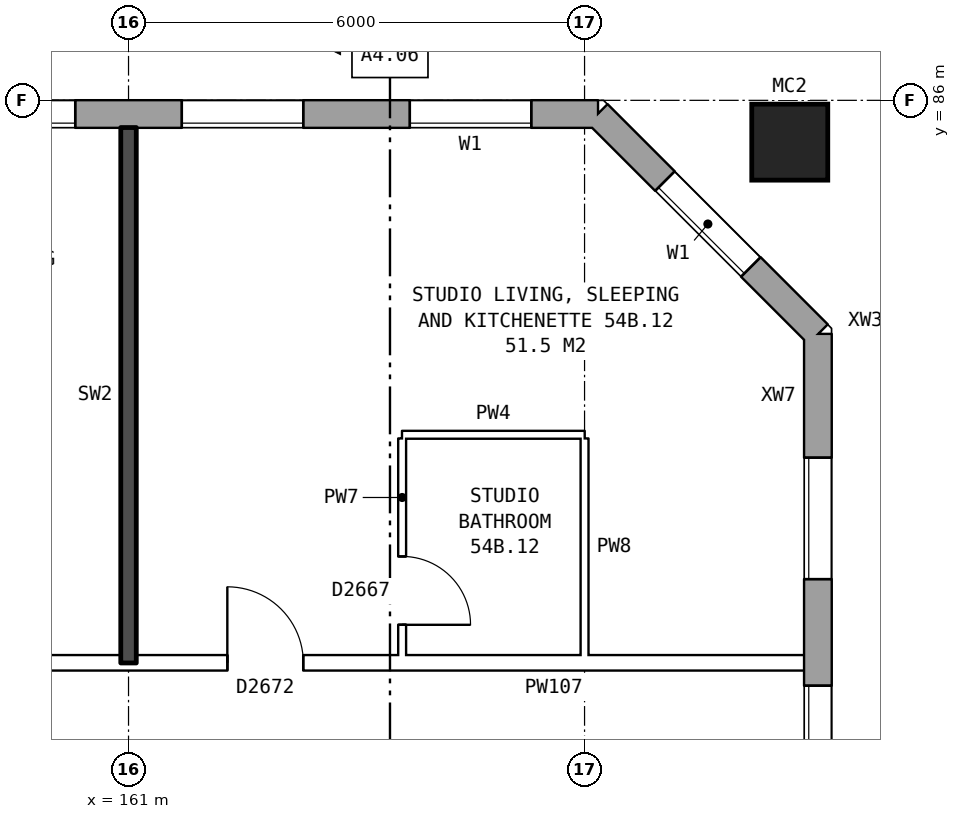
"""IFC4 building model, lengths in metres.
Left out: names, types, materials, properties, quantities, classifications, styles, units other than length and angle.
Written with IfcOpenShell. Run it as: python <this file> out.ifc"""

import sys

from ifc_helpers import new_model, si_unit, direction, frame, frame_2d, origin, origin_2d, place, context, subcontext, project, spatial, rectangle, hollow_rectangle, extrude, element, fill, save


model = new_model("IFC4")
c1 = context("Model", 3, precision=1e-05, world=origin(), true_north=direction((0.0, 1.0)))
c2 = subcontext(c1, "Body", "Model", "MODEL_VIEW")
j1 = project(units=[si_unit("LENGTHUNIT", "METRE"), si_unit("PLANEANGLEUNIT", "RADIAN")], contexts=[c1])
p1 = place(None, origin())
s1 = spatial("IfcSite", under=j1, at=p1, CompositionType="ELEMENT")
p2 = place(p1, origin())
s2 = spatial("IfcBuilding", under=s1, at=p2, CompositionType="ELEMENT")
p3 = place(p2, frame((0.0, 0.0, 191.3)))
s3 = spatial("IfcBuildingStorey", under=s2, at=p3, CompositionType="ELEMENT", Elevation=191.3)
p4 = place(p3, frame((169.7, 85.45, 0.0), z_axis=(0.0, 0.0, 1.0), x_axis=(1.0, 0.0, 0.0)))
e1 = element("IfcColumn", 1, at=p4, inside=s3, PredefinedType="COLUMN", context=c2, shape_type="SweptSolid", body=[
    extrude(hollow_rectangle(XDim=1.0, YDim=1.0, WallThickness=0.055, at=origin_2d()), origin(), (0.0, 0.0, 1.0), 3.1),
])
p5 = place(p3, frame((170.07, 57.075, 0.0), z_axis=(0.0, 0.0, 1.0), x_axis=(0.0, 1.0, 0.0)))
e2 = element("IfcWall", 2, at=p5, inside=s3, PredefinedType="STANDARD", context=c2, shape_type="SweptSolid", body=[
    extrude(rectangle(XDim=25.851, YDim=0.36, at=frame_2d((12.925, 0.0))), origin(), (0.0, 0.0, 1.0), 2.85),
])
p6 = place(p5, frame((1.625, 0.0, 0.8)))
e3 = element("IfcOpeningElement", 3, at=p6, cuts=e2, PredefinedType="OPENING", context=c2, shape_type="SweptSolid", body=[
    extrude(rectangle(XDim=1.6, YDim=1.8, at=frame_2d((0.8, 0.9))), frame((0.0, 0.19, 0.0), z_axis=(0.0, -1.0, 0.0), x_axis=(1.0, 0.0, 0.0)), (0.0, 0.0, 1.0), 0.38),
])
p7 = place(p5, frame((4.625, 0.0, 0.8)))
e4 = element("IfcOpeningElement", 4, at=p7, cuts=e2, PredefinedType="OPENING", context=c2, shape_type="SweptSolid", body=[
    extrude(rectangle(XDim=1.6, YDim=1.8, at=frame_2d((0.8, 0.9))), frame((0.0, 0.19, 0.0), z_axis=(0.0, -1.0, 0.0), x_axis=(1.0, 0.0, 0.0)), (0.0, 0.0, 1.0), 0.38),
])
p8 = place(p5, frame((7.625, 0.0, 0.8)))
e5 = element("IfcOpeningElement", 5, at=p8, cuts=e2, PredefinedType="OPENING", context=c2, shape_type="SweptSolid", body=[
    extrude(rectangle(XDim=1.6, YDim=1.8, at=frame_2d((0.8, 0.9))), frame((0.0, 0.19, 0.0), z_axis=(0.0, -1.0, 0.0), x_axis=(1.0, 0.0, 0.0)), (0.0, 0.0, 1.0), 0.38),
])
p9 = place(p5, frame((10.625, 0.0, 0.8)))
e6 = element("IfcOpeningElement", 6, at=p9, cuts=e2, PredefinedType="OPENING", context=c2, shape_type="SweptSolid", body=[
    extrude(rectangle(XDim=1.6, YDim=1.8, at=frame_2d((0.8, 0.9))), frame((0.0, 0.19, 0.0), z_axis=(0.0, -1.0, 0.0), x_axis=(1.0, 0.0, 0.0)), (0.0, 0.0, 1.0), 0.38),
])
p10 = place(p5, frame((13.625, 0.0, 0.8)))
e7 = element("IfcOpeningElement", 7, at=p10, cuts=e2, PredefinedType="OPENING", context=c2, shape_type="SweptSolid", body=[
    extrude(rectangle(XDim=1.6, YDim=1.8, at=frame_2d((0.8, 0.9))), frame((0.0, 0.19, 0.0), z_axis=(0.0, -1.0, 0.0), x_axis=(1.0, 0.0, 0.0)), (0.0, 0.0, 1.0), 0.38),
])
p11 = place(p5, frame((16.625, 0.0, 0.8)))
e8 = element("IfcOpeningElement", 8, at=p11, cuts=e2, PredefinedType="OPENING", context=c2, shape_type="SweptSolid", body=[
    extrude(rectangle(XDim=1.6, YDim=1.8, at=frame_2d((0.8, 0.9))), frame((0.0, 0.19, 0.0), z_axis=(0.0, -1.0, 0.0), x_axis=(1.0, 0.0, 0.0)), (0.0, 0.0, 1.0), 0.38),
])
p12 = place(p5, frame((19.625, 0.0, 0.8)))
e9 = element("IfcOpeningElement", 9, at=p12, cuts=e2, PredefinedType="OPENING", context=c2, shape_type="SweptSolid", body=[
    extrude(rectangle(XDim=1.6, YDim=1.8, at=frame_2d((0.8, 0.9))), frame((0.0, 0.19, 0.0), z_axis=(0.0, -1.0, 0.0), x_axis=(1.0, 0.0, 0.0)), (0.0, 0.0, 1.0), 0.38),
])
p13 = place(p5, frame((22.625, 0.0, 0.8)))
e10 = element("IfcOpeningElement", 10, at=p13, cuts=e2, PredefinedType="OPENING", context=c2, shape_type="SweptSolid", body=[
    extrude(rectangle(XDim=1.6, YDim=1.8, at=frame_2d((0.8, 0.9))), frame((0.0, 0.19, 0.0), z_axis=(0.0, -1.0, 0.0), x_axis=(1.0, 0.0, 0.0)), (0.0, 0.0, 1.0), 0.38),
])
p14 = place(p3, frame((170.07, 82.925, 0.0), z_axis=(0.0, 0.0, 1.0), x_axis=(-0.707106781187, 0.707106781187, 0.0)))
e11 = element("IfcWall", 11, at=p14, inside=s3, PredefinedType="STANDARD", context=c2, shape_type="SweptSolid", body=[
    extrude(rectangle(XDim=4.094, YDim=0.36, at=frame_2d((2.047, 0.0))), origin(), (0.0, 0.0, 1.0), 2.85),
])
p15 = place(p14, frame((1.247, 0.0, 0.8)))
e12 = element("IfcOpeningElement", 12, at=p15, cuts=e11, PredefinedType="OPENING", context=c2, shape_type="SweptSolid", body=[
    extrude(rectangle(XDim=1.6, YDim=1.8, at=frame_2d((0.8, 0.9))), frame((0.0, 0.19, 0.0), z_axis=(0.0, -1.0, 0.0), x_axis=(1.0, 0.0, 0.0)), (0.0, 0.0, 1.0), 0.38),
])
p16 = place(p3, frame((167.175, 85.82, 0.0), z_axis=(0.0, 0.0, 1.0), x_axis=(-1.0, 0.0, 0.0)))
e13 = element("IfcWall", 13, at=p16, inside=s3, PredefinedType="STANDARD", context=c2, shape_type="SweptSolid", body=[
    extrude(rectangle(XDim=33.101, YDim=0.36, at=frame_2d((16.55, 0.0))), origin(), (0.0, 0.0, 1.0), 2.85),
])
p17 = place(p16, frame((0.875, 0.0, 0.8)))
e14 = element("IfcOpeningElement", 14, at=p17, cuts=e13, PredefinedType="OPENING", context=c2, shape_type="SweptSolid", body=[
    extrude(rectangle(XDim=1.6, YDim=1.8, at=frame_2d((0.8, 0.9))), frame((0.0, 0.19, 0.0), z_axis=(0.0, -1.0, 0.0), x_axis=(1.0, 0.0, 0.0)), (0.0, 0.0, 1.0), 0.38),
])
p18 = place(p16, frame((3.875, 0.0, 0.8)))
e15 = element("IfcOpeningElement", 15, at=p18, cuts=e13, PredefinedType="OPENING", context=c2, shape_type="SweptSolid", body=[
    extrude(rectangle(XDim=1.6, YDim=1.8, at=frame_2d((0.8, 0.9))), frame((0.0, 0.19, 0.0), z_axis=(0.0, -1.0, 0.0), x_axis=(1.0, 0.0, 0.0)), (0.0, 0.0, 1.0), 0.38),
])
p19 = place(p16, frame((6.875, 0.0, 0.8)))
e16 = element("IfcOpeningElement", 16, at=p19, cuts=e13, PredefinedType="OPENING", context=c2, shape_type="SweptSolid", body=[
    extrude(rectangle(XDim=1.6, YDim=1.8, at=frame_2d((0.8, 0.9))), frame((0.0, 0.19, 0.0), z_axis=(0.0, -1.0, 0.0), x_axis=(1.0, 0.0, 0.0)), (0.0, 0.0, 1.0), 0.38),
])
p20 = place(p16, frame((9.875, 0.0, 0.8)))
e17 = element("IfcOpeningElement", 17, at=p20, cuts=e13, PredefinedType="OPENING", context=c2, shape_type="SweptSolid", body=[
    extrude(rectangle(XDim=1.6, YDim=1.8, at=frame_2d((0.8, 0.9))), frame((0.0, 0.19, 0.0), z_axis=(0.0, -1.0, 0.0), x_axis=(1.0, 0.0, 0.0)), (0.0, 0.0, 1.0), 0.38),
])
p21 = place(p16, frame((12.875, 0.0, 0.8)))
e18 = element("IfcOpeningElement", 18, at=p21, cuts=e13, PredefinedType="OPENING", context=c2, shape_type="SweptSolid", body=[
    extrude(rectangle(XDim=1.6, YDim=1.8, at=frame_2d((0.8, 0.9))), frame((0.0, 0.19, 0.0), z_axis=(0.0, -1.0, 0.0), x_axis=(1.0, 0.0, 0.0)), (0.0, 0.0, 1.0), 0.38),
])
p22 = place(p16, frame((15.925, 0.0, 0.15)))
e19 = element("IfcOpeningElement", 19, at=p22, cuts=e13, PredefinedType="OPENING", context=c2, shape_type="SweptSolid", body=[
    extrude(rectangle(XDim=1.2, YDim=1.2, at=frame_2d((0.6, 0.6))), frame((0.0, 0.19, 0.0), z_axis=(0.0, -1.0, 0.0), x_axis=(1.0, 0.0, 0.0)), (0.0, 0.0, 1.0), 0.38),
])
p23 = place(p16, frame((18.875, 0.0, 0.8)))
e20 = element("IfcOpeningElement", 20, at=p23, cuts=e13, PredefinedType="OPENING", context=c2, shape_type="SweptSolid", body=[
    extrude(rectangle(XDim=1.6, YDim=1.8, at=frame_2d((0.8, 0.9))), frame((0.0, 0.19, 0.0), z_axis=(0.0, -1.0, 0.0), x_axis=(1.0, 0.0, 0.0)), (0.0, 0.0, 1.0), 0.38),
])
p24 = place(p16, frame((21.875, 0.0, 0.8)))
e21 = element("IfcOpeningElement", 21, at=p24, cuts=e13, PredefinedType="OPENING", context=c2, shape_type="SweptSolid", body=[
    extrude(rectangle(XDim=1.6, YDim=1.8, at=frame_2d((0.8, 0.9))), frame((0.0, 0.19, 0.0), z_axis=(0.0, -1.0, 0.0), x_axis=(1.0, 0.0, 0.0)), (0.0, 0.0, 1.0), 0.38),
])
p25 = place(p16, frame((24.875, 0.0, 0.8)))
e22 = element("IfcOpeningElement", 22, at=p25, cuts=e13, PredefinedType="OPENING", context=c2, shape_type="SweptSolid", body=[
    extrude(rectangle(XDim=1.6, YDim=1.8, at=frame_2d((0.8, 0.9))), frame((0.0, 0.19, 0.0), z_axis=(0.0, -1.0, 0.0), x_axis=(1.0, 0.0, 0.0)), (0.0, 0.0, 1.0), 0.38),
])
p26 = place(p16, frame((27.875, 0.0, 0.8)))
e23 = element("IfcOpeningElement", 23, at=p26, cuts=e13, PredefinedType="OPENING", context=c2, shape_type="SweptSolid", body=[
    extrude(rectangle(XDim=1.6, YDim=1.8, at=frame_2d((0.8, 0.9))), frame((0.0, 0.19, 0.0), z_axis=(0.0, -1.0, 0.0), x_axis=(1.0, 0.0, 0.0)), (0.0, 0.0, 1.0), 0.38),
])
p27 = place(p16, frame((30.875, 0.0, 0.8)))
e24 = element("IfcOpeningElement", 24, at=p27, cuts=e13, PredefinedType="OPENING", context=c2, shape_type="SweptSolid", body=[
    extrude(rectangle(XDim=1.6, YDim=1.8, at=frame_2d((0.8, 0.9))), frame((0.0, 0.19, 0.0), z_axis=(0.0, -1.0, 0.0), x_axis=(1.0, 0.0, 0.0)), (0.0, 0.0, 1.0), 0.38),
])
p28 = place(p3, frame((155.1, 78.6, 0.0), z_axis=(0.0, 0.0, 1.0), x_axis=(1.0, 0.0, 0.0)))
e25 = element("IfcWall", 25, at=p28, inside=s3, PredefinedType="PARTITIONING", context=c2, shape_type="SweptSolid", body=[
    extrude(rectangle(XDim=14.79, YDim=0.2, at=frame_2d((7.395, 0.0))), origin(), (0.0, 0.0, 1.0), 2.85),
])
p29 = place(p28, frame((3.6, 0.0, 0.0)))
e26 = element("IfcOpeningElement", 26, at=p29, cuts=e25, PredefinedType="OPENING", context=c2, shape_type="SweptSolid", body=[
    extrude(rectangle(XDim=1.0, YDim=2.1, at=frame_2d((0.5, 1.05))), frame((0.0, 0.11, 0.0), z_axis=(0.0, -1.0, 0.0), x_axis=(1.0, 0.0, 0.0)), (0.0, 0.0, 1.0), 0.22),
])
p30 = place(p28, frame((7.2, 0.0, 0.0)))
e27 = element("IfcOpeningElement", 27, at=p30, cuts=e25, PredefinedType="OPENING", context=c2, shape_type="SweptSolid", body=[
    extrude(rectangle(XDim=1.0, YDim=2.1, at=frame_2d((0.5, 1.05))), frame((0.0, 0.11, 0.0), z_axis=(0.0, -1.0, 0.0), x_axis=(1.0, 0.0, 0.0)), (0.0, 0.0, 1.0), 0.22),
])
p31 = place(p3, frame((164.6, 81.6, 0.0), z_axis=(0.0, 0.0, 1.0), x_axis=(1.0, 0.0, 0.0)))
e28 = element("IfcWall", 28, at=p31, inside=s3, PredefinedType="PARTITIONING", context=c2, shape_type="SweptSolid", body=[
    extrude(rectangle(XDim=2.4, YDim=0.1, at=frame_2d((1.2, 0.0))), origin(), (0.0, 0.0, 1.0), 2.85),
])
p32 = place(p3, frame((161.0, 78.6, 0.0), z_axis=(0.0, 0.0, 1.0), x_axis=(0.0, 1.0, 0.0)))
e29 = element("IfcWall", 29, at=p32, inside=s3, PredefinedType="SOLIDWALL", context=c2, shape_type="SweptSolid", body=[
    extrude(rectangle(XDim=7.04, YDim=0.2, at=frame_2d((3.52, 0.0))), origin(), (0.0, 0.0, 1.0), 2.85),
])
p33 = place(p3, frame((164.6, 78.7, 0.0), z_axis=(0.0, 0.0, 1.0), x_axis=(0.0, 1.0, 0.0)))
e30 = element("IfcWall", 30, at=p33, inside=s3, PredefinedType="PARTITIONING", context=c2, shape_type="SweptSolid", body=[
    extrude(rectangle(XDim=2.85, YDim=0.1, at=frame_2d((1.425, 0.0))), origin(), (0.0, 0.0, 1.0), 2.85),
])
p34 = place(p33, frame((0.4, 0.0, 0.0)))
e31 = element("IfcOpeningElement", 31, at=p34, cuts=e30, PredefinedType="OPENING", context=c2, shape_type="SweptSolid", body=[
    extrude(rectangle(XDim=0.9, YDim=2.1, at=frame_2d((0.45, 1.05))), frame((0.0, 0.06, 0.0), z_axis=(0.0, -1.0, 0.0), x_axis=(1.0, 0.0, 0.0)), (0.0, 0.0, 1.0), 0.12),
])
p35 = place(p3, frame((167.0, 78.7, 0.0), z_axis=(0.0, 0.0, 1.0), x_axis=(0.0, 1.0, 0.0)))
e32 = element("IfcWall", 32, at=p35, inside=s3, PredefinedType="PARTITIONING", context=c2, shape_type="SweptSolid", body=[
    extrude(rectangle(XDim=2.85, YDim=0.1, at=frame_2d((1.425, 0.0))), origin(), (0.0, 0.0, 1.0), 2.85),
])
p36 = place(p12, origin())
e33 = element("IfcWindow", 33, at=p36, inside=s3, PartitioningType="SINGLE_PANEL", PredefinedType="WINDOW", context=c2, shape_type="SweptSolid", body=[
    extrude(rectangle(XDim=1.6, YDim=1.8, at=frame_2d((0.8, 0.9))), frame((0.0, 0.15, 0.0), z_axis=(0.0, -1.0, 0.0), x_axis=(1.0, 0.0, 0.0)), (0.0, 0.0, 1.0), 0.06),
])
fill(e9, e33)
p37 = place(p13, origin())
e34 = element("IfcWindow", 34, at=p37, inside=s3, PartitioningType="SINGLE_PANEL", PredefinedType="WINDOW", context=c2, shape_type="SweptSolid", body=[
    extrude(rectangle(XDim=1.6, YDim=1.8, at=frame_2d((0.8, 0.9))), frame((0.0, 0.15, 0.0), z_axis=(0.0, -1.0, 0.0), x_axis=(1.0, 0.0, 0.0)), (0.0, 0.0, 1.0), 0.06),
])
fill(e10, e34)
p38 = place(p15, origin())
e35 = element("IfcWindow", 35, at=p38, inside=s3, PartitioningType="SINGLE_PANEL", PredefinedType="WINDOW", context=c2, shape_type="SweptSolid", body=[
    extrude(rectangle(XDim=1.6, YDim=1.8, at=frame_2d((0.8, 0.9))), frame((0.0, 0.15, 0.0), z_axis=(0.0, -1.0, 0.0), x_axis=(1.0, 0.0, 0.0)), (0.0, 0.0, 1.0), 0.06),
])
fill(e12, e35)
p39 = place(p17, origin())
e36 = element("IfcWindow", 36, at=p39, inside=s3, PartitioningType="SINGLE_PANEL", PredefinedType="WINDOW", context=c2, shape_type="SweptSolid", body=[
    extrude(rectangle(XDim=1.6, YDim=1.8, at=frame_2d((0.8, 0.9))), frame((0.0, 0.15, 0.0), z_axis=(0.0, -1.0, 0.0), x_axis=(1.0, 0.0, 0.0)), (0.0, 0.0, 1.0), 0.06),
])
fill(e14, e36)
p40 = place(p18, origin())
e37 = element("IfcWindow", 37, at=p40, inside=s3, PartitioningType="SINGLE_PANEL", PredefinedType="WINDOW", context=c2, shape_type="SweptSolid", body=[
    extrude(rectangle(XDim=1.6, YDim=1.8, at=frame_2d((0.8, 0.9))), frame((0.0, 0.15, 0.0), z_axis=(0.0, -1.0, 0.0), x_axis=(1.0, 0.0, 0.0)), (0.0, 0.0, 1.0), 0.06),
])
fill(e15, e37)
p41 = place(p19, origin())
e38 = element("IfcWindow", 38, at=p41, inside=s3, PartitioningType="SINGLE_PANEL", PredefinedType="WINDOW", context=c2, shape_type="SweptSolid", body=[
    extrude(rectangle(XDim=1.6, YDim=1.8, at=frame_2d((0.8, 0.9))), frame((0.0, 0.15, 0.0), z_axis=(0.0, -1.0, 0.0), x_axis=(1.0, 0.0, 0.0)), (0.0, 0.0, 1.0), 0.06),
])
fill(e16, e38)
p42 = place(p30, origin())
e39 = element("IfcDoor", 39, at=p42, inside=s3, OperationType="SINGLE_SWING_LEFT", PredefinedType="DOOR", context=c2, shape_type="SweptSolid", body=[
    extrude(rectangle(XDim=1.0, YDim=2.1, at=frame_2d((0.5, 1.05))), frame((0.0, 0.025, 0.0), z_axis=(0.0, -1.0, 0.0), x_axis=(1.0, 0.0, 0.0)), (0.0, 0.0, 1.0), 0.05),
])
fill(e27, e39)
p43 = place(p34, frame((0.9, 0.0, 0.0), z_axis=(0.0, 0.0, 1.0), x_axis=(-1.0, 0.0, 0.0)))
e40 = element("IfcDoor", 40, at=p43, inside=s3, OperationType="SINGLE_SWING_RIGHT", PredefinedType="DOOR", context=c2, shape_type="SweptSolid", body=[
    extrude(rectangle(XDim=0.9, YDim=2.1, at=frame_2d((0.45, 1.05))), frame((0.0, 0.025, 0.0), z_axis=(0.0, -1.0, 0.0), x_axis=(1.0, 0.0, 0.0)), (0.0, 0.0, 1.0), 0.05),
])
fill(e31, e40)
save(model, sys.argv[1])
